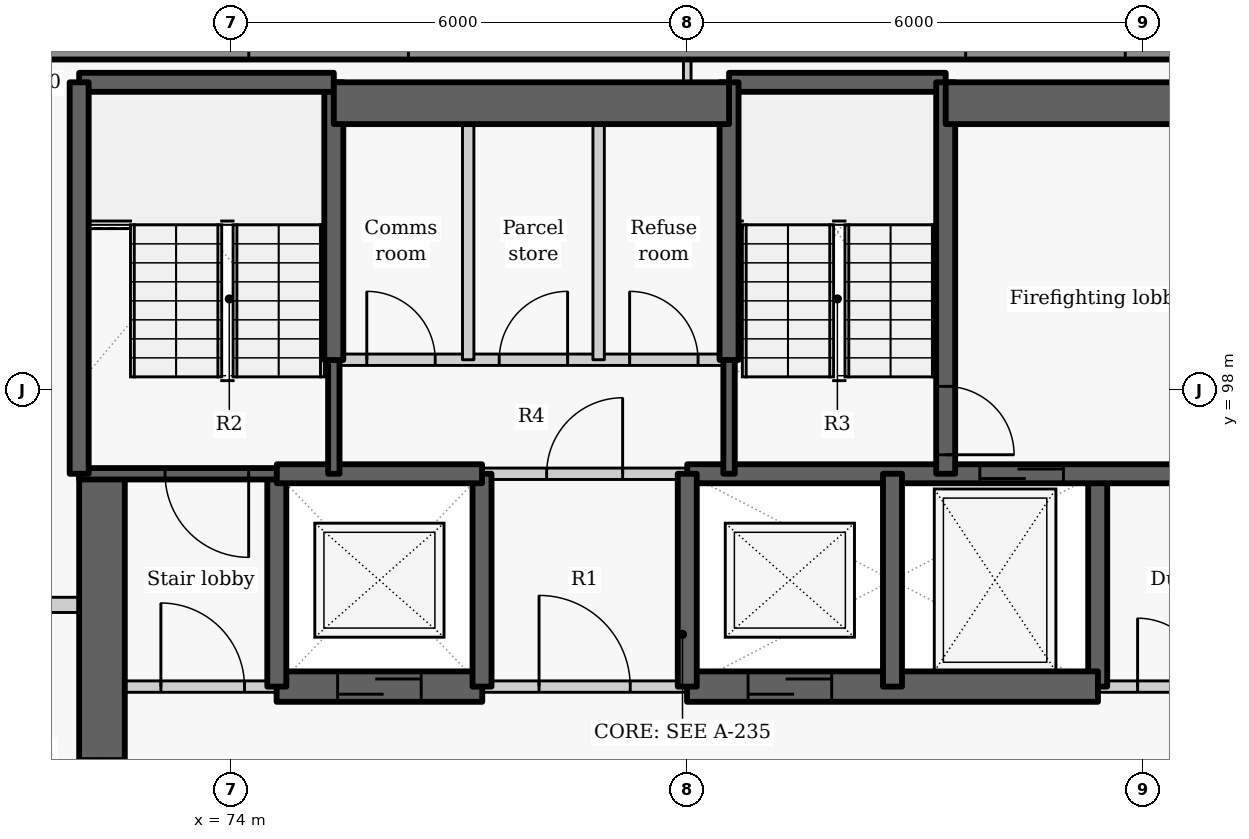
"""IFC4 building model, lengths in metres.
Left out: names, types, materials, properties, quantities, classifications, styles, units other than length and angle.
Written with IfcOpenShell. Run it as: python <this file> out.ifc"""

import sys

from ifc_helpers import new_model, si_unit, direction, frame, frame_2d, origin, place, context, subcontext, project, spatial, rectangle, extrude, element, fill, save


model = new_model("IFC4")
c1 = context("Model", 3, precision=1e-05, world=origin(), true_north=direction((0.0, 1.0)))
c2 = subcontext(c1, "Body", "Model", "MODEL_VIEW")
j1 = project(units=[si_unit("LENGTHUNIT", "METRE"), si_unit("PLANEANGLEUNIT", "RADIAN")], contexts=[c1])
p1 = place(None, origin())
s1 = spatial("IfcSite", under=j1, at=p1, CompositionType="ELEMENT")
p2 = place(p1, origin())
s2 = spatial("IfcBuilding", under=s1, at=p2, CompositionType="ELEMENT")
p3 = place(p2, frame((0.0, 0.0, 203.1)))
s3 = spatial("IfcBuildingStorey", under=s2, at=p3, CompositionType="ELEMENT", Elevation=203.1)
p4 = place(p3, frame((89.449, 102.5, 0.0), z_axis=(0.0, 0.0, 1.0), x_axis=(-1.0, 0.0, 0.0)))
e1 = element("IfcWall", 1, at=p4, inside=s3, PredefinedType="SOLIDWALL", context=c2, shape_type="SweptSolid", body=[
    extrude(rectangle(XDim=18.933, YDim=0.3, at=frame_2d((9.466, 0.0))), origin(), (0.0, 0.0, 1.0), 2.425),
])
p5 = place(p4, frame((3.687, 0.0, 0.9)))
e2 = element("IfcOpeningElement", 2, at=p5, cuts=e1, PredefinedType="OPENING", context=c2, shape_type="SweptSolid", body=[
    extrude(rectangle(XDim=2.1, YDim=1.1, at=frame_2d((1.05, 0.55))), frame((0.0, 0.16, 0.0), z_axis=(0.0, -1.0, 0.0), x_axis=(1.0, 0.0, 0.0)), (0.0, 0.0, 1.0), 0.32),
])
p6 = place(p4, frame((13.118, 0.0, 0.9)))
e3 = element("IfcOpeningElement", 3, at=p6, cuts=e1, PredefinedType="OPENING", context=c2, shape_type="SweptSolid", body=[
    extrude(rectangle(XDim=2.1, YDim=1.1, at=frame_2d((1.05, 0.55))), frame((0.0, 0.16, 0.0), z_axis=(0.0, -1.0, 0.0), x_axis=(1.0, 0.0, 0.0)), (0.0, 0.0, 1.0), 0.32),
])
p7 = place(p3, frame((72.3, 87.8, -0.275), z_axis=(0.0, 0.0, 1.0), x_axis=(0.0, 1.0, 0.0)))
e4 = element("IfcWall", 4, at=p7, inside=s3, PredefinedType="SHEAR", context=c2, shape_type="SweptSolid", body=[
    extrude(rectangle(XDim=9.1, YDim=0.6, at=frame_2d((4.55, 0.0))), origin(), (0.0, 0.0, 1.0), 3.3),
])
p8 = place(p7, frame((3.852, 0.0, 0.275)))
e5 = element("IfcOpeningElement", 5, at=p8, cuts=e4, PredefinedType="OPENING", context=c2, shape_type="SweptSolid", body=[
    extrude(rectangle(XDim=1.5, YDim=2.1, at=frame_2d((0.75, 1.05))), frame((0.0, 0.31, 0.0), z_axis=(0.0, -1.0, 0.0), x_axis=(1.0, 0.0, 0.0)), (0.0, 0.0, 1.0), 0.62),
])
p9 = place(p3, frame((85.4, 94.1, -0.275), z_axis=(0.0, 0.0, 1.0), x_axis=(0.0, 1.0, 0.0)))
e6 = element("IfcWall", 6, at=p9, inside=s3, PredefinedType="SHEAR", context=c2, shape_type="SweptSolid", body=[
    extrude(rectangle(XDim=2.8, YDim=0.25, at=frame_2d((1.4, 0.0))), origin(), (0.0, 0.0, 1.0), 3.3),
])
p10 = place(p3, frame((72.0, 94.1, 0.0), z_axis=(0.0, 0.0, 1.0), x_axis=(1.0, 0.0, 0.0)))
e7 = element("IfcWall", 7, at=p10, inside=s3, PredefinedType="PARTITIONING", context=c2, shape_type="SweptSolid", body=[
    extrude(rectangle(XDim=2.603, YDim=0.15, at=frame_2d((1.302, 0.0))), origin(), (0.0, 0.0, 1.0), 3.025),
])
p11 = place(p10, frame((1.075, 0.0, 0.0)))
e8 = element("IfcOpeningElement", 8, at=p11, cuts=e7, PredefinedType="OPENING", context=c2, shape_type="SweptSolid", body=[
    extrude(rectangle(XDim=1.1, YDim=2.1, at=frame_2d((0.55, 1.05))), frame((0.0, 0.085, 0.0), z_axis=(0.0, -1.0, 0.0), x_axis=(1.0, 0.0, 0.0)), (0.0, 0.0, 1.0), 0.17),
])
p12 = place(p3, frame((77.297, 94.1, 0.0), z_axis=(0.0, 0.0, 1.0), x_axis=(1.0, 0.0, 0.0)))
e9 = element("IfcWall", 9, at=p12, inside=s3, PredefinedType="PARTITIONING", context=c2, shape_type="SweptSolid", body=[
    extrude(rectangle(XDim=2.706, YDim=0.15, at=frame_2d((1.353, 0.0))), origin(), (0.0, 0.0, 1.0), 3.025),
])
p13 = place(p12, frame((0.753, 0.0, 0.0)))
e10 = element("IfcOpeningElement", 10, at=p13, cuts=e9, PredefinedType="OPENING", context=c2, shape_type="SweptSolid", body=[
    extrude(rectangle(XDim=1.2, YDim=2.1, at=frame_2d((0.6, 1.05))), frame((0.0, 0.085, 0.0), z_axis=(0.0, -1.0, 0.0), x_axis=(1.0, 0.0, 0.0)), (0.0, 0.0, 1.0), 0.17),
])
p14 = place(p3, frame((85.397, 94.1, 0.0), z_axis=(0.0, 0.0, 1.0), x_axis=(1.0, 0.0, 0.0)))
e11 = element("IfcWall", 11, at=p14, inside=s3, PredefinedType="PARTITIONING", context=c2, shape_type="SweptSolid", body=[
    extrude(rectangle(XDim=2.603, YDim=0.15, at=frame_2d((1.302, 0.0))), origin(), (0.0, 0.0, 1.0), 3.025),
])
p15 = place(p14, frame((0.528, 0.0, 0.0)))
e12 = element("IfcOpeningElement", 12, at=p15, cuts=e11, PredefinedType="OPENING", context=c2, shape_type="SweptSolid", body=[
    extrude(rectangle(XDim=0.9, YDim=2.1, at=frame_2d((0.45, 1.05))), frame((0.0, 0.085, 0.0), z_axis=(0.0, -1.0, 0.0), x_axis=(1.0, 0.0, 0.0)), (0.0, 0.0, 1.0), 0.17),
])
p16 = place(p3, frame((74.597, 94.1, -0.275), z_axis=(0.0, 0.0, 1.0), x_axis=(1.0, 0.0, 0.0)))
e13 = element("IfcWall", 13, at=p16, inside=s3, PredefinedType="SHEAR", context=c2, shape_type="SweptSolid", body=[
    extrude(rectangle(XDim=2.706, YDim=0.4, at=frame_2d((1.353, 0.0))), origin(), (0.0, 0.0, 1.0), 3.3),
])
p17 = place(p16, frame((0.803, 0.0, 0.275)))
e14 = element("IfcOpeningElement", 14, at=p17, cuts=e13, PredefinedType="OPENING", context=c2, shape_type="SweptSolid", body=[
    extrude(rectangle(XDim=1.1, YDim=2.1, at=frame_2d((0.55, 1.05))), frame((0.0, 0.21, 0.0), z_axis=(0.0, -1.0, 0.0), x_axis=(1.0, 0.0, 0.0)), (0.0, 0.0, 1.0), 0.42),
])
p18 = place(p3, frame((79.997, 94.1, -0.275), z_axis=(0.0, 0.0, 1.0), x_axis=(1.0, 0.0, 0.0)))
e15 = element("IfcWall", 15, at=p18, inside=s3, PredefinedType="SHEAR", context=c2, shape_type="SweptSolid", body=[
    extrude(rectangle(XDim=5.406, YDim=0.4, at=frame_2d((2.703, 0.0))), origin(), (0.0, 0.0, 1.0), 3.3),
])
p19 = place(p18, frame((0.803, 0.0, 0.275)))
e16 = element("IfcOpeningElement", 16, at=p19, cuts=e15, PredefinedType="OPENING", context=c2, shape_type="SweptSolid", body=[
    extrude(rectangle(XDim=1.1, YDim=2.1, at=frame_2d((0.55, 1.05))), frame((0.0, 0.21, 0.0), z_axis=(0.0, -1.0, 0.0), x_axis=(1.0, 0.0, 0.0)), (0.0, 0.0, 1.0), 0.42),
])
p20 = place(p3, frame((74.6, 94.1, -0.275), z_axis=(0.0, 0.0, 1.0), x_axis=(0.0, 1.0, 0.0)))
e17 = element("IfcWall", 17, at=p20, inside=s3, PredefinedType="SHEAR", context=c2, shape_type="SweptSolid", body=[
    extrude(rectangle(XDim=2.8, YDim=0.25, at=frame_2d((1.4, 0.0))), origin(), (0.0, 0.0, 1.0), 3.3),
])
p21 = place(p3, frame((74.6, 96.9, -0.275), z_axis=(0.0, 0.0, 1.0), x_axis=(-1.0, 0.0, 0.0)))
e18 = element("IfcWall", 18, at=p21, inside=s3, PredefinedType="SHEAR", context=c2, shape_type="SweptSolid", body=[
    extrude(rectangle(XDim=2.6, YDim=0.15, at=frame_2d((1.3, 0.0))), origin(), (0.0, 0.0, 1.0), 3.3),
])
p22 = place(p21, frame((0.37, 0.0, 0.275)))
e19 = element("IfcOpeningElement", 19, at=p22, cuts=e18, PredefinedType="OPENING", context=c2, shape_type="SweptSolid", body=[
    extrude(rectangle(XDim=1.1, YDim=2.1, at=frame_2d((0.55, 1.05))), frame((0.0, 0.085, 0.0), z_axis=(0.0, -1.0, 0.0), x_axis=(1.0, 0.0, 0.0)), (0.0, 0.0, 1.0), 0.17),
])
p23 = place(p3, frame((77.3, 94.1, -0.275), z_axis=(0.0, 0.0, 1.0), x_axis=(0.0, 1.0, 0.0)))
e20 = element("IfcWall", 20, at=p23, inside=s3, PredefinedType="SHEAR", context=c2, shape_type="SweptSolid", body=[
    extrude(rectangle(XDim=2.8, YDim=0.25, at=frame_2d((1.4, 0.0))), origin(), (0.0, 0.0, 1.0), 3.3),
])
p24 = place(p3, frame((74.6, 96.9, -0.275), z_axis=(0.0, 0.0, 1.0), x_axis=(1.0, 0.0, 0.0)))
e21 = element("IfcWall", 21, at=p24, inside=s3, PredefinedType="SHEAR", context=c2, shape_type="SweptSolid", body=[
    extrude(rectangle(XDim=2.7, YDim=0.25, at=frame_2d((1.35, 0.0))), origin(), (0.0, 0.0, 1.0), 3.3),
])
p25 = place(p3, frame((80.0, 96.9, -0.275), z_axis=(0.0, 0.0, 1.0), x_axis=(1.0, 0.0, 0.0)))
e22 = element("IfcWall", 22, at=p25, inside=s3, PredefinedType="SHEAR", context=c2, shape_type="SweptSolid", body=[
    extrude(rectangle(XDim=8.0, YDim=0.25, at=frame_2d((4.0, 0.0))), origin(), (0.0, 0.0, 1.0), 3.3),
])
p26 = place(p25, frame((3.849, 0.0, 0.275)))
e23 = element("IfcOpeningElement", 23, at=p26, cuts=e22, PredefinedType="OPENING", context=c2, shape_type="SweptSolid", body=[
    extrude(rectangle(XDim=1.1, YDim=2.1, at=frame_2d((0.55, 1.05))), frame((0.0, 0.135, 0.0), z_axis=(0.0, -1.0, 0.0), x_axis=(1.0, 0.0, 0.0)), (0.0, 0.0, 1.0), 0.27),
])
p27 = place(p3, frame((80.0, 94.1, -0.275), z_axis=(0.0, 0.0, 1.0), x_axis=(0.0, 1.0, 0.0)))
e24 = element("IfcWall", 24, at=p27, inside=s3, PredefinedType="SHEAR", context=c2, shape_type="SweptSolid", body=[
    extrude(rectangle(XDim=2.8, YDim=0.25, at=frame_2d((1.4, 0.0))), origin(), (0.0, 0.0, 1.0), 3.3),
])
p28 = place(p3, frame((77.3, 96.9, 0.0), z_axis=(0.0, 0.0, 1.0), x_axis=(1.0, 0.0, 0.0)))
e25 = element("IfcWall", 25, at=p28, inside=s3, PredefinedType="PARTITIONING", context=c2, shape_type="SweptSolid", body=[
    extrude(rectangle(XDim=2.7, YDim=0.15, at=frame_2d((1.35, 0.0))), origin(), (0.0, 0.0, 1.0), 3.025),
])
p29 = place(p28, frame((0.85, 0.0, 0.0)))
e26 = element("IfcOpeningElement", 26, at=p29, cuts=e25, PredefinedType="OPENING", context=c2, shape_type="SweptSolid", body=[
    extrude(rectangle(XDim=1.0, YDim=2.1, at=frame_2d((0.5, 1.05))), frame((0.0, 0.085, 0.0), z_axis=(0.0, -1.0, 0.0), x_axis=(1.0, 0.0, 0.0)), (0.0, 0.0, 1.0), 0.17),
])
p30 = place(p3, frame((82.7, 94.1, -0.275), z_axis=(0.0, 0.0, 1.0), x_axis=(0.0, 1.0, 0.0)))
e27 = element("IfcWall", 27, at=p30, inside=s3, PredefinedType="SHEAR", context=c2, shape_type="SweptSolid", body=[
    extrude(rectangle(XDim=2.8, YDim=0.25, at=frame_2d((1.4, 0.0))), origin(), (0.0, 0.0, 1.0), 3.3),
])
p31 = place(p3, frame((75.35, 96.9, -0.275), z_axis=(0.0, 0.0, 1.0), x_axis=(0.0, 1.0, 0.0)))
e28 = element("IfcWall", 28, at=p31, inside=s3, PredefinedType="SHEAR", context=c2, shape_type="SweptSolid", body=[
    extrude(rectangle(XDim=1.503, YDim=0.15, at=frame_2d((0.751, 0.0))), origin(), (0.0, 0.0, 1.0), 3.3),
])
p32 = place(p3, frame((75.35, 98.397, -0.275), z_axis=(0.0, 0.0, 1.0), x_axis=(0.0, 1.0, 0.0)))
e29 = element("IfcWall", 29, at=p32, inside=s3, PredefinedType="SHEAR", context=c2, shape_type="SweptSolid", body=[
    extrude(rectangle(XDim=3.653, YDim=0.25, at=frame_2d((1.827, 0.0))), origin(), (0.0, 0.0, 1.0), 3.3),
])
p33 = place(p3, frame((72.0, 102.05, -0.275), z_axis=(0.0, 0.0, 1.0), x_axis=(1.0, 0.0, 0.0)))
e30 = element("IfcWall", 30, at=p33, inside=s3, PredefinedType="SHEAR", context=c2, shape_type="SweptSolid", body=[
    extrude(rectangle(XDim=3.35, YDim=0.25, at=frame_2d((1.675, 0.0))), origin(), (0.0, 0.0, 1.0), 3.3),
])
p34 = place(p3, frame((80.55, 102.05, -0.275), z_axis=(0.0, 0.0, 1.0), x_axis=(1.0, 0.0, 0.0)))
e31 = element("IfcWall", 31, at=p34, inside=s3, PredefinedType="SHEAR", context=c2, shape_type="SweptSolid", body=[
    extrude(rectangle(XDim=2.85, YDim=0.25, at=frame_2d((1.425, 0.0))), origin(), (0.0, 0.0, 1.0), 3.3),
])
p35 = place(p3, frame((72.0, 96.9, -0.275), z_axis=(0.0, 0.0, 1.0), x_axis=(0.0, 1.0, 0.0)))
e32 = element("IfcWall", 32, at=p35, inside=s3, PredefinedType="SHEAR", context=c2, shape_type="SweptSolid", body=[
    extrude(rectangle(XDim=5.15, YDim=0.25, at=frame_2d((2.575, 0.0))), origin(), (0.0, 0.0, 1.0), 3.3),
])
p36 = place(p3, frame((83.4, 102.05, -0.275), z_axis=(0.0, 0.0, 1.0), x_axis=(0.0, -1.0, 0.0)))
e33 = element("IfcWall", 33, at=p36, inside=s3, PredefinedType="SHEAR", context=c2, shape_type="SweptSolid", body=[
    extrude(rectangle(XDim=5.15, YDim=0.25, at=frame_2d((2.575, 0.0))), origin(), (0.0, 0.0, 1.0), 3.3),
])
p37 = place(p36, frame((4.0, 0.0, 0.275)))
e34 = element("IfcOpeningElement", 34, at=p37, cuts=e33, PredefinedType="OPENING", context=c2, shape_type="SweptSolid", body=[
    extrude(rectangle(XDim=0.9, YDim=2.1, at=frame_2d((0.45, 1.05))), frame((0.0, 0.135, 0.0), z_axis=(0.0, -1.0, 0.0), x_axis=(1.0, 0.0, 0.0)), (0.0, 0.0, 1.0), 0.27),
])
p38 = place(p3, frame((80.55, 96.9, -0.275), z_axis=(0.0, 0.0, 1.0), x_axis=(0.0, 1.0, 0.0)))
e35 = element("IfcWall", 35, at=p38, inside=s3, PredefinedType="SHEAR", context=c2, shape_type="SweptSolid", body=[
    extrude(rectangle(XDim=1.503, YDim=0.15, at=frame_2d((0.751, 0.0))), origin(), (0.0, 0.0, 1.0), 3.3),
])
p39 = place(p3, frame((80.55, 98.397, -0.275), z_axis=(0.0, 0.0, 1.0), x_axis=(0.0, 1.0, 0.0)))
e36 = element("IfcWall", 36, at=p39, inside=s3, PredefinedType="SHEAR", context=c2, shape_type="SweptSolid", body=[
    extrude(rectangle(XDim=3.653, YDim=0.25, at=frame_2d((1.827, 0.0))), origin(), (0.0, 0.0, 1.0), 3.3),
])
p40 = place(p3, frame((75.35, 101.775, -0.275), z_axis=(0.0, 0.0, 1.0), x_axis=(1.0, 0.0, 0.0)))
e37 = element("IfcWall", 37, at=p40, inside=s3, PredefinedType="SHEAR", context=c2, shape_type="SweptSolid", body=[
    extrude(rectangle(XDim=5.2, YDim=0.55, at=frame_2d((2.6, 0.0))), origin(), (0.0, 0.0, 1.0), 3.3),
])
p41 = place(p3, frame((83.4, 101.775, -0.275), z_axis=(0.0, 0.0, 1.0), x_axis=(1.0, 0.0, 0.0)))
e38 = element("IfcWall", 38, at=p41, inside=s3, PredefinedType="SHEAR", context=c2, shape_type="SweptSolid", body=[
    extrude(rectangle(XDim=4.6, YDim=0.55, at=frame_2d((2.3, 0.0))), origin(), (0.0, 0.0, 1.0), 3.3),
])
p42 = place(p3, frame((75.35, 98.4, 0.0), z_axis=(0.0, 0.0, 1.0), x_axis=(1.0, 0.0, 0.0)))
e39 = element("IfcWall", 39, at=p42, inside=s3, PredefinedType="PARTITIONING", context=c2, shape_type="SweptSolid", body=[
    extrude(rectangle(XDim=5.2, YDim=0.15, at=frame_2d((2.6, 0.0))), origin(), (0.0, 0.0, 1.0), 3.025),
])
p43 = place(p42, frame((0.434, 0.0, 0.0)))
e40 = element("IfcOpeningElement", 40, at=p43, cuts=e39, PredefinedType="OPENING", context=c2, shape_type="SweptSolid", body=[
    extrude(rectangle(XDim=0.9, YDim=2.1, at=frame_2d((0.45, 1.05))), frame((0.0, 0.085, 0.0), z_axis=(0.0, -1.0, 0.0), x_axis=(1.0, 0.0, 0.0)), (0.0, 0.0, 1.0), 0.17),
])
p44 = place(p42, frame((2.176, 0.0, 0.0)))
e41 = element("IfcOpeningElement", 41, at=p44, cuts=e39, PredefinedType="OPENING", context=c2, shape_type="SweptSolid", body=[
    extrude(rectangle(XDim=0.9, YDim=2.1, at=frame_2d((0.45, 1.05))), frame((0.0, 0.085, 0.0), z_axis=(0.0, -1.0, 0.0), x_axis=(1.0, 0.0, 0.0)), (0.0, 0.0, 1.0), 0.17),
])
p45 = place(p42, frame((3.892, 0.0, 0.0)))
e42 = element("IfcOpeningElement", 42, at=p45, cuts=e39, PredefinedType="OPENING", context=c2, shape_type="SweptSolid", body=[
    extrude(rectangle(XDim=0.9, YDim=2.1, at=frame_2d((0.45, 1.05))), frame((0.0, 0.085, 0.0), z_axis=(0.0, -1.0, 0.0), x_axis=(1.0, 0.0, 0.0)), (0.0, 0.0, 1.0), 0.17),
])
for number, where, z_axis, x_axis in (
    (43, (77.118, 98.4, 0.0), (0.0, 0.0, 1.0), (0.0, 1.0, 0.0)),
    (44, (78.834, 98.4, 0.0), (0.0, 0.0, 1.0), (0.0, 1.0, 0.0)),
):
    element("IfcWall", number, at=place(p3, frame(where, z_axis=z_axis, x_axis=x_axis)), inside=s3, PredefinedType="PARTITIONING", context=c2, shape_type="SweptSolid", body=[
        extrude(rectangle(XDim=3.65, YDim=0.15, at=frame_2d((1.825, 0.0))), origin(), (0.0, 0.0, 1.0), 3.025),
    ])
p46 = place(p3, frame((69.587, 95.175, 0.0), z_axis=(0.0, 0.0, 1.0), x_axis=(1.0, 0.0, 0.0)))
e45 = element("IfcWall", 45, at=p46, inside=s3, PredefinedType="PARTITIONING", context=c2, shape_type="SweptSolid", body=[
    extrude(rectangle(XDim=2.413, YDim=0.2, at=frame_2d((1.207, 0.0))), origin(), (0.0, 0.0, 1.0), 2.505),
])
p47 = place(p3, frame((80.0, 102.05, 0.0), z_axis=(0.0, 0.0, 1.0), x_axis=(0.0, 1.0, 0.0)))
e46 = element("IfcWall", 46, at=p47, inside=s3, PredefinedType="PARTITIONING", context=c2, shape_type="SweptSolid", body=[
    extrude(rectangle(XDim=0.3, YDim=0.1, at=frame_2d((0.15, 0.0))), origin(), (0.0, 0.0, 1.0), 3.025),
])
p48 = place(p11, origin())
e47 = element("IfcDoor", 47, at=p48, inside=s3, OperationType="SINGLE_SWING_LEFT", PredefinedType="DOOR", context=c2, shape_type="SweptSolid", body=[
    extrude(rectangle(XDim=1.1, YDim=2.1, at=frame_2d((0.55, 1.05))), frame((0.0, 0.025, 0.0), z_axis=(0.0, -1.0, 0.0), x_axis=(1.0, 0.0, 0.0)), (0.0, 0.0, 1.0), 0.05),
])
fill(e8, e47)
p49 = place(p17, origin())
e48 = element("IfcDoor", 48, at=p49, inside=s3, OperationType="SLIDING_TO_LEFT", PredefinedType="DOOR", context=c2, shape_type="SweptSolid", body=[
    extrude(rectangle(XDim=1.1, YDim=2.1, at=frame_2d((0.55, 1.05))), frame((0.0, 0.025, 0.0), z_axis=(0.0, -1.0, 0.0), x_axis=(1.0, 0.0, 0.0)), (0.0, 0.0, 1.0), 0.05),
])
fill(e14, e48)
p50 = place(p13, origin())
e49 = element("IfcDoor", 49, at=p50, inside=s3, OperationType="DOUBLE_DOOR_SINGLE_SWING", PredefinedType="DOOR", context=c2, shape_type="SweptSolid", body=[
    extrude(rectangle(XDim=1.2, YDim=2.1, at=frame_2d((0.6, 1.05))), frame((0.0, 0.025, 0.0), z_axis=(0.0, -1.0, 0.0), x_axis=(1.0, 0.0, 0.0)), (0.0, 0.0, 1.0), 0.05),
])
fill(e10, e49)
p51 = place(p19, origin())
e50 = element("IfcDoor", 50, at=p51, inside=s3, OperationType="SLIDING_TO_LEFT", PredefinedType="DOOR", context=c2, shape_type="SweptSolid", body=[
    extrude(rectangle(XDim=1.1, YDim=2.1, at=frame_2d((0.55, 1.05))), frame((0.0, 0.025, 0.0), z_axis=(0.0, -1.0, 0.0), x_axis=(1.0, 0.0, 0.0)), (0.0, 0.0, 1.0), 0.05),
])
fill(e16, e50)
p52 = place(p26, origin())
e51 = element("IfcDoor", 51, at=p52, inside=s3, OperationType="SLIDING_TO_LEFT", PredefinedType="DOOR", context=c2, shape_type="SweptSolid", body=[
    extrude(rectangle(XDim=1.1, YDim=2.1, at=frame_2d((0.55, 1.05))), frame((0.0, 0.025, 0.0), z_axis=(0.0, -1.0, 0.0), x_axis=(1.0, 0.0, 0.0)), (0.0, 0.0, 1.0), 0.05),
])
fill(e23, e51)
p53 = place(p15, origin())
e52 = element("IfcDoor", 52, at=p53, inside=s3, OperationType="SINGLE_SWING_LEFT", PredefinedType="DOOR", context=c2, shape_type="SweptSolid", body=[
    extrude(rectangle(XDim=0.9, YDim=2.1, at=frame_2d((0.45, 1.05))), frame((0.0, 0.025, 0.0), z_axis=(0.0, -1.0, 0.0), x_axis=(1.0, 0.0, 0.0)), (0.0, 0.0, 1.0), 0.05),
])
fill(e12, e52)
p54 = place(p29, origin())
e53 = element("IfcDoor", 53, at=p54, inside=s3, OperationType="SINGLE_SWING_RIGHT", PredefinedType="DOOR", context=c2, shape_type="SweptSolid", body=[
    extrude(rectangle(XDim=1.0, YDim=2.1, at=frame_2d((0.5, 1.05))), frame((0.0, 0.025, 0.0), z_axis=(0.0, -1.0, 0.0), x_axis=(1.0, 0.0, 0.0)), (0.0, 0.0, 1.0), 0.05),
])
fill(e26, e53)
p55 = place(p43, origin())
e54 = element("IfcDoor", 54, at=p55, inside=s3, OperationType="SINGLE_SWING_LEFT", PredefinedType="DOOR", context=c2, shape_type="SweptSolid", body=[
    extrude(rectangle(XDim=0.9, YDim=2.1, at=frame_2d((0.45, 1.05))), frame((0.0, 0.025, 0.0), z_axis=(0.0, -1.0, 0.0), x_axis=(1.0, 0.0, 0.0)), (0.0, 0.0, 1.0), 0.05),
])
fill(e40, e54)
p56 = place(p44, origin())
e55 = element("IfcDoor", 55, at=p56, inside=s3, OperationType="SINGLE_SWING_RIGHT", PredefinedType="DOOR", context=c2, shape_type="SweptSolid", body=[
    extrude(rectangle(XDim=0.9, YDim=2.1, at=frame_2d((0.45, 1.05))), frame((0.0, 0.025, 0.0), z_axis=(0.0, -1.0, 0.0), x_axis=(1.0, 0.0, 0.0)), (0.0, 0.0, 1.0), 0.05),
])
fill(e41, e55)
p57 = place(p45, origin())
e56 = element("IfcDoor", 56, at=p57, inside=s3, OperationType="SINGLE_SWING_LEFT", PredefinedType="DOOR", context=c2, shape_type="SweptSolid", body=[
    extrude(rectangle(XDim=0.9, YDim=2.1, at=frame_2d((0.45, 1.05))), frame((0.0, 0.025, 0.0), z_axis=(0.0, -1.0, 0.0), x_axis=(1.0, 0.0, 0.0)), (0.0, 0.0, 1.0), 0.05),
])
fill(e42, e56)
p58 = place(p22, origin())
e57 = element("IfcDoor", 57, at=p58, inside=s3, OperationType="SINGLE_SWING_LEFT", PredefinedType="DOOR", context=c2, shape_type="SweptSolid", body=[
    extrude(rectangle(XDim=1.1, YDim=2.1, at=frame_2d((0.55, 1.05))), frame((0.0, 0.025, 0.0), z_axis=(0.0, -1.0, 0.0), x_axis=(1.0, 0.0, 0.0)), (0.0, 0.0, 1.0), 0.05),
])
fill(e19, e57)
p59 = place(p37, origin())
e58 = element("IfcDoor", 58, at=p59, inside=s3, OperationType="SINGLE_SWING_RIGHT", PredefinedType="DOOR", context=c2, shape_type="SweptSolid", body=[
    extrude(rectangle(XDim=0.9, YDim=2.1, at=frame_2d((0.45, 1.05))), frame((0.0, 0.025, 0.0), z_axis=(0.0, -1.0, 0.0), x_axis=(1.0, 0.0, 0.0)), (0.0, 0.0, 1.0), 0.05),
])
fill(e34, e58)
p60 = place(p8, origin())
e59 = element("IfcDoor", 59, at=p60, inside=s3, OperationType="DOUBLE_DOOR_SINGLE_SWING", PredefinedType="DOOR", context=c2, shape_type="SweptSolid", body=[
    extrude(rectangle(XDim=1.5, YDim=2.1, at=frame_2d((0.75, 1.05))), frame((0.0, 0.025, 0.0), z_axis=(0.0, -1.0, 0.0), x_axis=(1.0, 0.0, 0.0)), (0.0, 0.0, 1.0), 0.05),
])
fill(e5, e59)
save(model, sys.argv[1])
